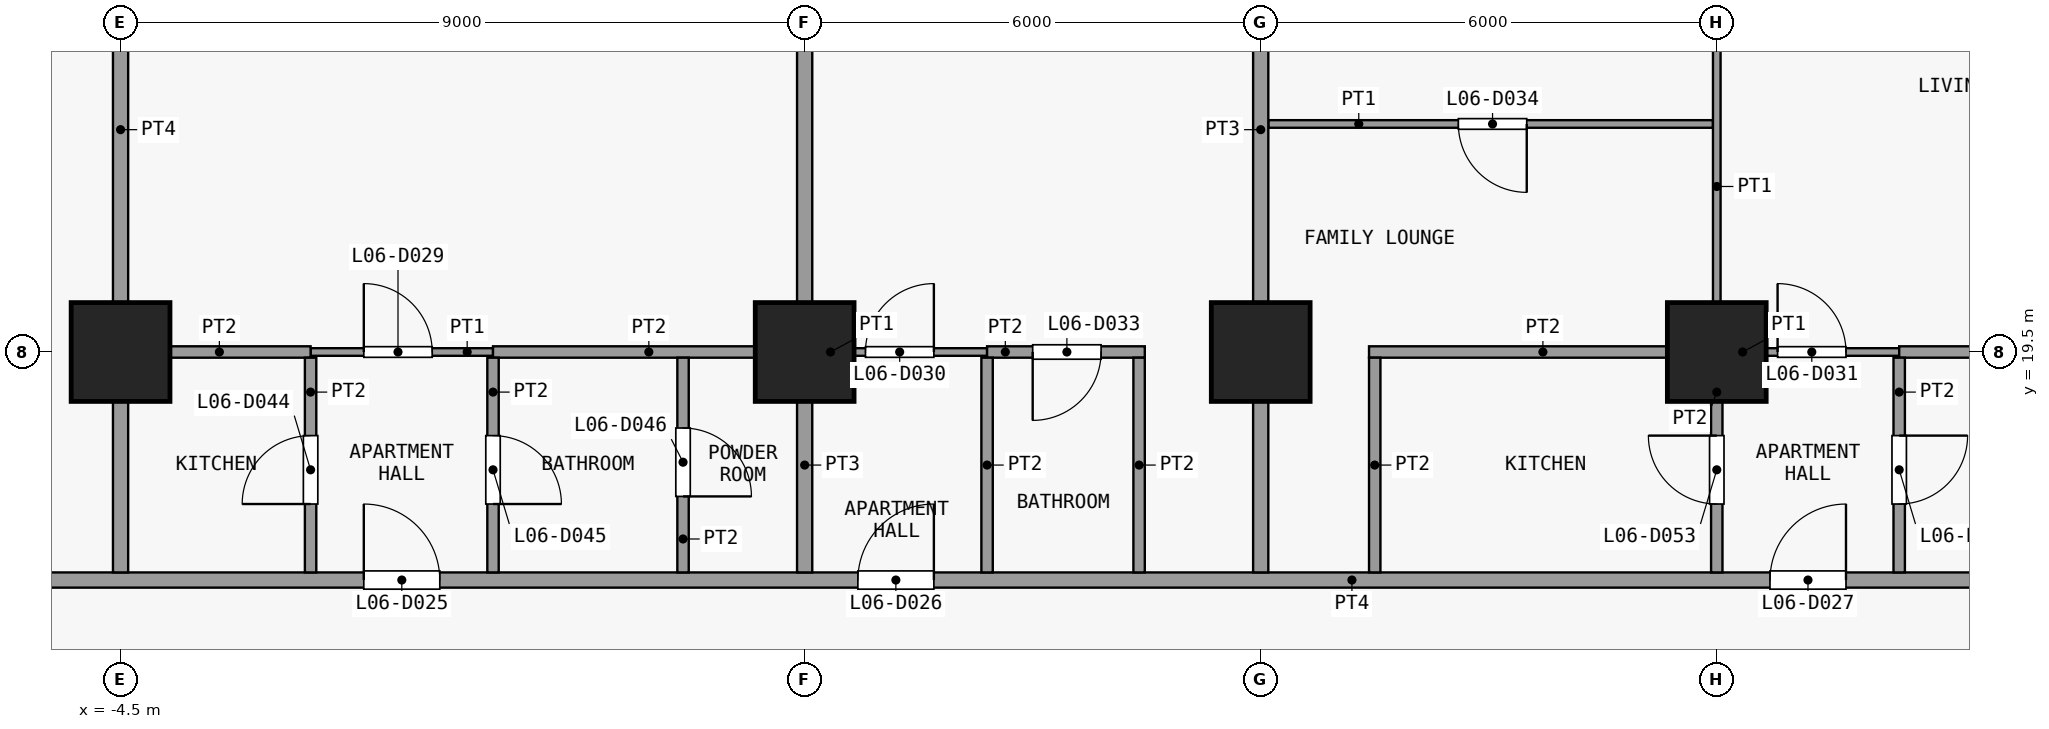
"""IFC4 building model, lengths in metres.
Left out: names, types, materials, properties, quantities, classifications, styles, units other than length and angle.
Written with IfcOpenShell. Run it as: python <this file> out.ifc"""

import sys

from ifc_helpers import new_model, si_unit, direction, frame, frame_2d, origin, origin_2d, place, context, subcontext, project, spatial, rectangle, extrude, element, fill, save


model = new_model("IFC4")
c1 = context("Model", 3, precision=1e-05, world=origin(), true_north=direction((0.0, 1.0)))
c2 = subcontext(c1, "Body", "Model", "MODEL_VIEW")
j1 = project(units=[si_unit("LENGTHUNIT", "METRE"), si_unit("PLANEANGLEUNIT", "RADIAN")], contexts=[c1])
p1 = place(None, origin())
s1 = spatial("IfcSite", under=j1, at=p1, CompositionType="ELEMENT")
p2 = place(p1, origin())
s2 = spatial("IfcBuilding", under=s1, at=p2, CompositionType="ELEMENT")
p3 = place(p2, frame((0.0, 0.0, 32.5)))
s3 = spatial("IfcBuildingStorey", under=s2, at=p3, CompositionType="ELEMENT", Elevation=32.5)
for number, where, z_axis, x_axis in (
    (1, (-4.5, 19.5, 0.0), (0.0, 0.0, 1.0), (1.0, 0.0, 0.0)),
    (2, (4.5, 19.5, 0.0), (0.0, 0.0, 1.0), (1.0, 0.0, 0.0)),
    (3, (10.5, 19.5, 0.0), (0.0, 0.0, 1.0), (1.0, 0.0, 0.0)),
    (4, (16.5, 19.5, 0.0), (0.0, 0.0, 1.0), (1.0, 0.0, 0.0)),
):
    element("IfcColumn", number, at=place(p3, frame(where, z_axis=z_axis, x_axis=x_axis)), inside=s3, PredefinedType="COLUMN", context=c2, shape_type="SweptSolid", body=[
        extrude(rectangle(XDim=1.3, YDim=1.3, at=origin_2d()), origin(), (0.0, 0.0, 1.0), 3.6),
    ])
p4 = place(p3, frame((-25.35, 16.5, 0.0), z_axis=(0.0, 0.0, 1.0), x_axis=(1.0, 0.0, 0.0)))
e5 = element("IfcWall", 5, at=p4, inside=s3, PredefinedType="PARTITIONING", context=c2, shape_type="SweptSolid", body=[
    extrude(rectangle(XDim=51.6, YDim=0.2, at=frame_2d((25.8, 0.0))), origin(), (0.0, 0.0, 1.0), 3.3),
])
p5 = place(p4, frame((4.55, 0.0, 0.0)))
e6 = element("IfcOpeningElement", 6, at=p5, cuts=e5, PredefinedType="OPENING", context=c2, shape_type="SweptSolid", body=[
    extrude(rectangle(XDim=1.0, YDim=2.1, at=frame_2d((0.5, 1.05))), frame((0.0, 0.11, 0.0), z_axis=(0.0, -1.0, 0.0), x_axis=(1.0, 0.0, 0.0)), (0.0, 0.0, 1.0), 0.22),
])
p6 = place(p4, frame((11.35, 0.0, 0.0)))
e7 = element("IfcOpeningElement", 7, at=p6, cuts=e5, PredefinedType="OPENING", context=c2, shape_type="SweptSolid", body=[
    extrude(rectangle(XDim=0.9, YDim=2.1, at=frame_2d((0.45, 1.05))), frame((0.0, 0.11, 0.0), z_axis=(0.0, -1.0, 0.0), x_axis=(1.0, 0.0, 0.0)), (0.0, 0.0, 1.0), 0.22),
])
p7 = place(p4, frame((17.35, 0.0, 0.0)))
e8 = element("IfcOpeningElement", 8, at=p7, cuts=e5, PredefinedType="OPENING", context=c2, shape_type="SweptSolid", body=[
    extrude(rectangle(XDim=0.9, YDim=2.1, at=frame_2d((0.45, 1.05))), frame((0.0, 0.11, 0.0), z_axis=(0.0, -1.0, 0.0), x_axis=(1.0, 0.0, 0.0)), (0.0, 0.0, 1.0), 0.22),
])
p8 = place(p4, frame((24.05, 0.0, 0.0)))
e9 = element("IfcOpeningElement", 9, at=p8, cuts=e5, PredefinedType="OPENING", context=c2, shape_type="SweptSolid", body=[
    extrude(rectangle(XDim=1.0, YDim=2.1, at=frame_2d((0.5, 1.05))), frame((0.0, 0.11, 0.0), z_axis=(0.0, -1.0, 0.0), x_axis=(1.0, 0.0, 0.0)), (0.0, 0.0, 1.0), 0.22),
])
p9 = place(p4, frame((30.55, 0.0, 0.0)))
e10 = element("IfcOpeningElement", 10, at=p9, cuts=e5, PredefinedType="OPENING", context=c2, shape_type="SweptSolid", body=[
    extrude(rectangle(XDim=1.0, YDim=2.1, at=frame_2d((0.5, 1.05))), frame((0.0, 0.11, 0.0), z_axis=(0.0, -1.0, 0.0), x_axis=(1.0, 0.0, 0.0)), (0.0, 0.0, 1.0), 0.22),
])
p10 = place(p4, frame((42.55, 0.0, 0.0)))
e11 = element("IfcOpeningElement", 11, at=p10, cuts=e5, PredefinedType="OPENING", context=c2, shape_type="SweptSolid", body=[
    extrude(rectangle(XDim=1.0, YDim=2.1, at=frame_2d((0.5, 1.05))), frame((0.0, 0.11, 0.0), z_axis=(0.0, -1.0, 0.0), x_axis=(1.0, 0.0, 0.0)), (0.0, 0.0, 1.0), 0.22),
])
p11 = place(p3, frame((-2.0, 19.5, 0.0), z_axis=(0.0, 0.0, 1.0), x_axis=(1.0, 0.0, 0.0)))
e12 = element("IfcWall", 12, at=p11, inside=s3, PredefinedType="PARTITIONING", context=c2, shape_type="SweptSolid", body=[
    extrude(rectangle(XDim=2.4, YDim=0.1, at=frame_2d((1.2, 0.0))), origin(), (0.0, 0.0, 1.0), 3.3),
])
p12 = place(p11, frame((0.7, 0.0, 0.0)))
e13 = element("IfcOpeningElement", 13, at=p12, cuts=e12, PredefinedType="OPENING", context=c2, shape_type="SweptSolid", body=[
    extrude(rectangle(XDim=0.9, YDim=2.1, at=frame_2d((0.45, 1.05))), frame((0.0, 0.06, 0.0), z_axis=(0.0, -1.0, 0.0), x_axis=(1.0, 0.0, 0.0)), (0.0, 0.0, 1.0), 0.12),
])
p13 = place(p3, frame((4.5, 19.5, 0.0), z_axis=(0.0, 0.0, 1.0), x_axis=(1.0, 0.0, 0.0)))
e14 = element("IfcWall", 14, at=p13, inside=s3, PredefinedType="PARTITIONING", context=c2, shape_type="SweptSolid", body=[
    extrude(rectangle(XDim=2.4, YDim=0.1, at=frame_2d((1.2, 0.0))), origin(), (0.0, 0.0, 1.0), 3.3),
])
p14 = place(p13, frame((0.8, 0.0, 0.0)))
e15 = element("IfcOpeningElement", 15, at=p14, cuts=e14, PredefinedType="OPENING", context=c2, shape_type="SweptSolid", body=[
    extrude(rectangle(XDim=0.9, YDim=2.1, at=frame_2d((0.45, 1.05))), frame((0.0, 0.06, 0.0), z_axis=(0.0, -1.0, 0.0), x_axis=(1.0, 0.0, 0.0)), (0.0, 0.0, 1.0), 0.12),
])
p15 = place(p3, frame((16.5, 19.5, 0.0), z_axis=(0.0, 0.0, 1.0), x_axis=(1.0, 0.0, 0.0)))
e16 = element("IfcWall", 16, at=p15, inside=s3, PredefinedType="PARTITIONING", context=c2, shape_type="SweptSolid", body=[
    extrude(rectangle(XDim=2.4, YDim=0.1, at=frame_2d((1.2, 0.0))), origin(), (0.0, 0.0, 1.0), 3.3),
])
p16 = place(p15, frame((0.8, 0.0, 0.0)))
e17 = element("IfcOpeningElement", 17, at=p16, cuts=e16, PredefinedType="OPENING", context=c2, shape_type="SweptSolid", body=[
    extrude(rectangle(XDim=0.9, YDim=2.1, at=frame_2d((0.45, 1.05))), frame((0.0, 0.06, 0.0), z_axis=(0.0, -1.0, 0.0), x_axis=(1.0, 0.0, 0.0)), (0.0, 0.0, 1.0), 0.12),
])
p17 = place(p3, frame((-4.4, 19.5, 0.0), z_axis=(0.0, 0.0, 1.0), x_axis=(1.0, 0.0, 0.0)))
e18 = element("IfcWall", 18, at=p17, inside=s3, PredefinedType="PARTITIONING", context=c2, shape_type="SweptSolid", body=[
    extrude(rectangle(XDim=2.4, YDim=0.15, at=frame_2d((1.2, 0.0))), origin(), (0.0, 0.0, 1.0), 3.3),
])
p18 = place(p3, frame((0.4, 19.5, 0.0), z_axis=(0.0, 0.0, 1.0), x_axis=(1.0, 0.0, 0.0)))
e19 = element("IfcWall", 19, at=p18, inside=s3, PredefinedType="PARTITIONING", context=c2, shape_type="SweptSolid", body=[
    extrude(rectangle(XDim=4.1, YDim=0.15, at=frame_2d((2.05, 0.0))), origin(), (0.0, 0.0, 1.0), 3.3),
])
p19 = place(p3, frame((6.9, 19.5, 0.0), z_axis=(0.0, 0.0, 1.0), x_axis=(1.0, 0.0, 0.0)))
e20 = element("IfcWall", 20, at=p19, inside=s3, PredefinedType="PARTITIONING", context=c2, shape_type="SweptSolid", body=[
    extrude(rectangle(XDim=2.075, YDim=0.15, at=frame_2d((1.038, 0.0))), origin(), (0.0, 0.0, 1.0), 3.3),
])
p20 = place(p19, frame((0.6, 0.0, 0.0)))
e21 = element("IfcOpeningElement", 21, at=p20, cuts=e20, PredefinedType="OPENING", context=c2, shape_type="SweptSolid", body=[
    extrude(rectangle(XDim=0.9, YDim=2.1, at=frame_2d((0.45, 1.05))), frame((0.0, 0.085, 0.0), z_axis=(0.0, -1.0, 0.0), x_axis=(1.0, 0.0, 0.0)), (0.0, 0.0, 1.0), 0.17),
])
p21 = place(p3, frame((11.925, 19.5, 0.0), z_axis=(0.0, 0.0, 1.0), x_axis=(1.0, 0.0, 0.0)))
e22 = element("IfcWall", 22, at=p21, inside=s3, PredefinedType="PARTITIONING", context=c2, shape_type="SweptSolid", body=[
    extrude(rectangle(XDim=4.575, YDim=0.15, at=frame_2d((2.288, 0.0))), origin(), (0.0, 0.0, 1.0), 3.3),
])
p22 = place(p3, frame((18.9, 19.5, 0.0), z_axis=(0.0, 0.0, 1.0), x_axis=(1.0, 0.0, 0.0)))
e23 = element("IfcWall", 23, at=p22, inside=s3, PredefinedType="PARTITIONING", context=c2, shape_type="SweptSolid", body=[
    extrude(rectangle(XDim=6.35, YDim=0.15, at=frame_2d((3.175, 0.0))), origin(), (0.0, 0.0, 1.0), 3.3),
])
p23 = place(p3, frame((10.6, 22.5, 0.0), z_axis=(0.0, 0.0, 1.0), x_axis=(1.0, 0.0, 0.0)))
e24 = element("IfcWall", 24, at=p23, inside=s3, PredefinedType="PARTITIONING", context=c2, shape_type="SweptSolid", body=[
    extrude(rectangle(XDim=5.85, YDim=0.1, at=frame_2d((2.925, 0.0))), origin(), (0.0, 0.0, 1.0), 3.3),
])
p24 = place(p23, frame((2.5, 0.0, 0.0)))
e25 = element("IfcOpeningElement", 25, at=p24, cuts=e24, PredefinedType="OPENING", context=c2, shape_type="SweptSolid", body=[
    extrude(rectangle(XDim=0.9, YDim=2.1, at=frame_2d((0.45, 1.05))), frame((0.0, 0.06, 0.0), z_axis=(0.0, -1.0, 0.0), x_axis=(1.0, 0.0, 0.0)), (0.0, 0.0, 1.0), 0.12),
])
p25 = place(p3, frame((-4.5, 16.6, 0.0), z_axis=(0.0, 0.0, 1.0), x_axis=(0.0, 1.0, 0.0)))
e26 = element("IfcWall", 26, at=p25, inside=s3, PredefinedType="PARTITIONING", context=c2, shape_type="SweptSolid", body=[
    extrude(rectangle(XDim=11.65, YDim=0.2, at=frame_2d((5.825, 0.0))), origin(), (0.0, 0.0, 1.0), 3.3),
])
p26 = place(p3, frame((-2.0, 16.6, 0.0), z_axis=(0.0, 0.0, 1.0), x_axis=(0.0, 1.0, 0.0)))
e27 = element("IfcWall", 27, at=p26, inside=s3, PredefinedType="PARTITIONING", context=c2, shape_type="SweptSolid", body=[
    extrude(rectangle(XDim=2.825, YDim=0.15, at=frame_2d((1.413, 0.0))), origin(), (0.0, 0.0, 1.0), 3.3),
])
p27 = place(p26, frame((0.9, 0.0, 0.0)))
e28 = element("IfcOpeningElement", 28, at=p27, cuts=e27, PredefinedType="OPENING", context=c2, shape_type="SweptSolid", body=[
    extrude(rectangle(XDim=0.9, YDim=2.1, at=frame_2d((0.45, 1.05))), frame((0.0, 0.085, 0.0), z_axis=(0.0, -1.0, 0.0), x_axis=(1.0, 0.0, 0.0)), (0.0, 0.0, 1.0), 0.17),
])
p28 = place(p3, frame((0.4, 16.6, 0.0), z_axis=(0.0, 0.0, 1.0), x_axis=(0.0, 1.0, 0.0)))
e29 = element("IfcWall", 29, at=p28, inside=s3, PredefinedType="PARTITIONING", context=c2, shape_type="SweptSolid", body=[
    extrude(rectangle(XDim=2.825, YDim=0.15, at=frame_2d((1.413, 0.0))), origin(), (0.0, 0.0, 1.0), 3.3),
])
p29 = place(p28, frame((0.9, 0.0, 0.0)))
e30 = element("IfcOpeningElement", 30, at=p29, cuts=e29, PredefinedType="OPENING", context=c2, shape_type="SweptSolid", body=[
    extrude(rectangle(XDim=0.9, YDim=2.1, at=frame_2d((0.45, 1.05))), frame((0.0, 0.085, 0.0), z_axis=(0.0, -1.0, 0.0), x_axis=(1.0, 0.0, 0.0)), (0.0, 0.0, 1.0), 0.17),
])
p30 = place(p3, frame((2.9, 16.6, 0.0), z_axis=(0.0, 0.0, 1.0), x_axis=(0.0, 1.0, 0.0)))
e31 = element("IfcWall", 31, at=p30, inside=s3, PredefinedType="PARTITIONING", context=c2, shape_type="SweptSolid", body=[
    extrude(rectangle(XDim=2.825, YDim=0.15, at=frame_2d((1.413, 0.0))), origin(), (0.0, 0.0, 1.0), 3.3),
])
p31 = place(p30, frame((1.0, 0.0, 0.0)))
e32 = element("IfcOpeningElement", 32, at=p31, cuts=e31, PredefinedType="OPENING", context=c2, shape_type="SweptSolid", body=[
    extrude(rectangle(XDim=0.9, YDim=2.1, at=frame_2d((0.45, 1.05))), frame((0.0, 0.085, 0.0), z_axis=(0.0, -1.0, 0.0), x_axis=(1.0, 0.0, 0.0)), (0.0, 0.0, 1.0), 0.17),
])
p32 = place(p3, frame((4.5, 16.6, 0.0), z_axis=(0.0, 0.0, 1.0), x_axis=(0.0, 1.0, 0.0)))
e33 = element("IfcWall", 33, at=p32, inside=s3, PredefinedType="PARTITIONING", context=c2, shape_type="SweptSolid", body=[
    extrude(rectangle(XDim=2.825, YDim=0.2, at=frame_2d((1.413, 0.0))), origin(), (0.0, 0.0, 1.0), 3.3),
])
p33 = place(p3, frame((4.5, 19.575, 0.0), z_axis=(0.0, 0.0, 1.0), x_axis=(0.0, 1.0, 0.0)))
e34 = element("IfcWall", 34, at=p33, inside=s3, PredefinedType="PARTITIONING", context=c2, shape_type="SweptSolid", body=[
    extrude(rectangle(XDim=8.675, YDim=0.2, at=frame_2d((4.337, 0.0))), origin(), (0.0, 0.0, 1.0), 3.3),
])
for number, where, z_axis, x_axis in (
    (35, (6.9, 16.6, 0.0), (0.0, 0.0, 1.0), (0.0, 1.0, 0.0)),
    (36, (8.9, 16.6, 0.0), (0.0, 0.0, 1.0), (0.0, 1.0, 0.0)),
):
    element("IfcWall", number, at=place(p3, frame(where, z_axis=z_axis, x_axis=x_axis)), inside=s3, PredefinedType="PARTITIONING", context=c2, shape_type="SweptSolid", body=[
        extrude(rectangle(XDim=2.825, YDim=0.15, at=frame_2d((1.413, 0.0))), origin(), (0.0, 0.0, 1.0), 3.3),
    ])
p34 = place(p3, frame((10.5, 16.6, 0.0), z_axis=(0.0, 0.0, 1.0), x_axis=(0.0, 1.0, 0.0)))
e37 = element("IfcWall", 37, at=p34, inside=s3, PredefinedType="PARTITIONING", context=c2, shape_type="SweptSolid", body=[
    extrude(rectangle(XDim=11.65, YDim=0.2, at=frame_2d((5.825, 0.0))), origin(), (0.0, 0.0, 1.0), 3.3),
])
p35 = place(p3, frame((12.0, 16.6, 0.0), z_axis=(0.0, 0.0, 1.0), x_axis=(0.0, 1.0, 0.0)))
e38 = element("IfcWall", 38, at=p35, inside=s3, PredefinedType="PARTITIONING", context=c2, shape_type="SweptSolid", body=[
    extrude(rectangle(XDim=2.825, YDim=0.15, at=frame_2d((1.413, 0.0))), origin(), (0.0, 0.0, 1.0), 3.3),
])
p36 = place(p3, frame((16.5, 19.575, 0.0), z_axis=(0.0, 0.0, 1.0), x_axis=(0.0, 1.0, 0.0)))
e39 = element("IfcWall", 39, at=p36, inside=s3, PredefinedType="PARTITIONING", context=c2, shape_type="SweptSolid", body=[
    extrude(rectangle(XDim=8.675, YDim=0.1, at=frame_2d((4.337, 0.0))), origin(), (0.0, 0.0, 1.0), 3.3),
])
p37 = place(p36, frame((4.325, 0.0, 0.0)))
e40 = element("IfcOpeningElement", 40, at=p37, cuts=e39, PredefinedType="OPENING", context=c2, shape_type="SweptSolid", body=[
    extrude(rectangle(XDim=0.9, YDim=2.1, at=frame_2d((0.45, 1.05))), frame((0.0, 0.06, 0.0), z_axis=(0.0, -1.0, 0.0), x_axis=(1.0, 0.0, 0.0)), (0.0, 0.0, 1.0), 0.12),
])
p38 = place(p3, frame((16.5, 16.6, 0.0), z_axis=(0.0, 0.0, 1.0), x_axis=(0.0, 1.0, 0.0)))
e41 = element("IfcWall", 41, at=p38, inside=s3, PredefinedType="PARTITIONING", context=c2, shape_type="SweptSolid", body=[
    extrude(rectangle(XDim=2.825, YDim=0.15, at=frame_2d((1.413, 0.0))), origin(), (0.0, 0.0, 1.0), 3.3),
])
p39 = place(p38, frame((0.9, 0.0, 0.0)))
e42 = element("IfcOpeningElement", 42, at=p39, cuts=e41, PredefinedType="OPENING", context=c2, shape_type="SweptSolid", body=[
    extrude(rectangle(XDim=0.9, YDim=2.1, at=frame_2d((0.45, 1.05))), frame((0.0, 0.085, 0.0), z_axis=(0.0, -1.0, 0.0), x_axis=(1.0, 0.0, 0.0)), (0.0, 0.0, 1.0), 0.17),
])
p40 = place(p3, frame((18.9, 16.6, 0.0), z_axis=(0.0, 0.0, 1.0), x_axis=(0.0, 1.0, 0.0)))
e43 = element("IfcWall", 43, at=p40, inside=s3, PredefinedType="PARTITIONING", context=c2, shape_type="SweptSolid", body=[
    extrude(rectangle(XDim=2.825, YDim=0.15, at=frame_2d((1.413, 0.0))), origin(), (0.0, 0.0, 1.0), 3.3),
])
p41 = place(p40, frame((0.9, 0.0, 0.0)))
e44 = element("IfcOpeningElement", 44, at=p41, cuts=e43, PredefinedType="OPENING", context=c2, shape_type="SweptSolid", body=[
    extrude(rectangle(XDim=0.9, YDim=2.1, at=frame_2d((0.45, 1.05))), frame((0.0, 0.085, 0.0), z_axis=(0.0, -1.0, 0.0), x_axis=(1.0, 0.0, 0.0)), (0.0, 0.0, 1.0), 0.17),
])
p42 = place(p8, origin())
e45 = element("IfcDoor", 45, at=p42, inside=s3, OperationType="SINGLE_SWING_RIGHT", PredefinedType="DOOR", context=c2, shape_type="SweptSolid", body=[
    extrude(rectangle(XDim=1.0, YDim=2.1, at=frame_2d((0.5, 1.05))), frame((0.0, 0.025, 0.0), z_axis=(0.0, -1.0, 0.0), x_axis=(1.0, 0.0, 0.0)), (0.0, 0.0, 1.0), 0.05),
])
fill(e9, e45)
p43 = place(p9, origin())
e46 = element("IfcDoor", 46, at=p43, inside=s3, OperationType="SINGLE_SWING_LEFT", PredefinedType="DOOR", context=c2, shape_type="SweptSolid", body=[
    extrude(rectangle(XDim=1.0, YDim=2.1, at=frame_2d((0.5, 1.05))), frame((0.0, 0.025, 0.0), z_axis=(0.0, -1.0, 0.0), x_axis=(1.0, 0.0, 0.0)), (0.0, 0.0, 1.0), 0.05),
])
fill(e10, e46)
p44 = place(p10, origin())
e47 = element("IfcDoor", 47, at=p44, inside=s3, OperationType="SINGLE_SWING_LEFT", PredefinedType="DOOR", context=c2, shape_type="SweptSolid", body=[
    extrude(rectangle(XDim=1.0, YDim=2.1, at=frame_2d((0.5, 1.05))), frame((0.0, 0.025, 0.0), z_axis=(0.0, -1.0, 0.0), x_axis=(1.0, 0.0, 0.0)), (0.0, 0.0, 1.0), 0.05),
])
fill(e11, e47)
p45 = place(p12, origin())
e48 = element("IfcDoor", 48, at=p45, inside=s3, OperationType="SINGLE_SWING_RIGHT", PredefinedType="DOOR", context=c2, shape_type="SweptSolid", body=[
    extrude(rectangle(XDim=0.9, YDim=2.1, at=frame_2d((0.45, 1.05))), frame((0.0, 0.025, 0.0), z_axis=(0.0, -1.0, 0.0), x_axis=(1.0, 0.0, 0.0)), (0.0, 0.0, 1.0), 0.05),
])
fill(e13, e48)
p46 = place(p14, origin())
e49 = element("IfcDoor", 49, at=p46, inside=s3, OperationType="SINGLE_SWING_LEFT", PredefinedType="DOOR", context=c2, shape_type="SweptSolid", body=[
    extrude(rectangle(XDim=0.9, YDim=2.1, at=frame_2d((0.45, 1.05))), frame((0.0, 0.025, 0.0), z_axis=(0.0, -1.0, 0.0), x_axis=(1.0, 0.0, 0.0)), (0.0, 0.0, 1.0), 0.05),
])
fill(e15, e49)
p47 = place(p16, origin())
e50 = element("IfcDoor", 50, at=p47, inside=s3, OperationType="SINGLE_SWING_RIGHT", PredefinedType="DOOR", context=c2, shape_type="SweptSolid", body=[
    extrude(rectangle(XDim=0.9, YDim=2.1, at=frame_2d((0.45, 1.05))), frame((0.0, 0.025, 0.0), z_axis=(0.0, -1.0, 0.0), x_axis=(1.0, 0.0, 0.0)), (0.0, 0.0, 1.0), 0.05),
])
fill(e17, e50)
p48 = place(p20, origin())
e51 = element("IfcDoor", 51, at=p48, inside=s3, OperationType="SINGLE_SWING_LEFT", PredefinedType="DOOR", context=c2, shape_type="SweptSolid", body=[
    extrude(rectangle(XDim=0.9, YDim=2.1, at=frame_2d((0.45, 1.05))), frame((0.0, 0.025, 0.0), z_axis=(0.0, -1.0, 0.0), x_axis=(1.0, 0.0, 0.0)), (0.0, 0.0, 1.0), 0.05),
])
fill(e21, e51)
p49 = place(p24, origin())
e52 = element("IfcDoor", 52, at=p49, inside=s3, OperationType="SINGLE_SWING_RIGHT", PredefinedType="DOOR", context=c2, shape_type="SweptSolid", body=[
    extrude(rectangle(XDim=0.9, YDim=2.1, at=frame_2d((0.45, 1.05))), frame((0.0, 0.025, 0.0), z_axis=(0.0, -1.0, 0.0), x_axis=(1.0, 0.0, 0.0)), (0.0, 0.0, 1.0), 0.05),
])
fill(e25, e52)
p50 = place(p27, origin())
e53 = element("IfcDoor", 53, at=p50, inside=s3, OperationType="SINGLE_SWING_RIGHT", PredefinedType="DOOR", context=c2, shape_type="SweptSolid", body=[
    extrude(rectangle(XDim=0.9, YDim=2.1, at=frame_2d((0.45, 1.05))), frame((0.0, 0.025, 0.0), z_axis=(0.0, -1.0, 0.0), x_axis=(1.0, 0.0, 0.0)), (0.0, 0.0, 1.0), 0.05),
])
fill(e28, e53)
p51 = place(p29, origin())
e54 = element("IfcDoor", 54, at=p51, inside=s3, OperationType="SINGLE_SWING_LEFT", PredefinedType="DOOR", context=c2, shape_type="SweptSolid", body=[
    extrude(rectangle(XDim=0.9, YDim=2.1, at=frame_2d((0.45, 1.05))), frame((0.0, 0.025, 0.0), z_axis=(0.0, -1.0, 0.0), x_axis=(1.0, 0.0, 0.0)), (0.0, 0.0, 1.0), 0.05),
])
fill(e30, e54)
p52 = place(p31, origin())
e55 = element("IfcDoor", 55, at=p52, inside=s3, OperationType="SINGLE_SWING_LEFT", PredefinedType="DOOR", context=c2, shape_type="SweptSolid", body=[
    extrude(rectangle(XDim=0.9, YDim=2.1, at=frame_2d((0.45, 1.05))), frame((0.0, 0.025, 0.0), z_axis=(0.0, -1.0, 0.0), x_axis=(1.0, 0.0, 0.0)), (0.0, 0.0, 1.0), 0.05),
])
fill(e32, e55)
p53 = place(p39, origin())
e56 = element("IfcDoor", 56, at=p53, inside=s3, OperationType="SINGLE_SWING_LEFT", PredefinedType="DOOR", context=c2, shape_type="SweptSolid", body=[
    extrude(rectangle(XDim=0.9, YDim=2.1, at=frame_2d((0.45, 1.05))), frame((0.0, 0.025, 0.0), z_axis=(0.0, -1.0, 0.0), x_axis=(1.0, 0.0, 0.0)), (0.0, 0.0, 1.0), 0.05),
])
fill(e42, e56)
p54 = place(p41, origin())
e57 = element("IfcDoor", 57, at=p54, inside=s3, OperationType="SINGLE_SWING_RIGHT", PredefinedType="DOOR", context=c2, shape_type="SweptSolid", body=[
    extrude(rectangle(XDim=0.9, YDim=2.1, at=frame_2d((0.45, 1.05))), frame((0.0, 0.025, 0.0), z_axis=(0.0, -1.0, 0.0), x_axis=(1.0, 0.0, 0.0)), (0.0, 0.0, 1.0), 0.05),
])
fill(e44, e57)
save(model, sys.argv[1])
